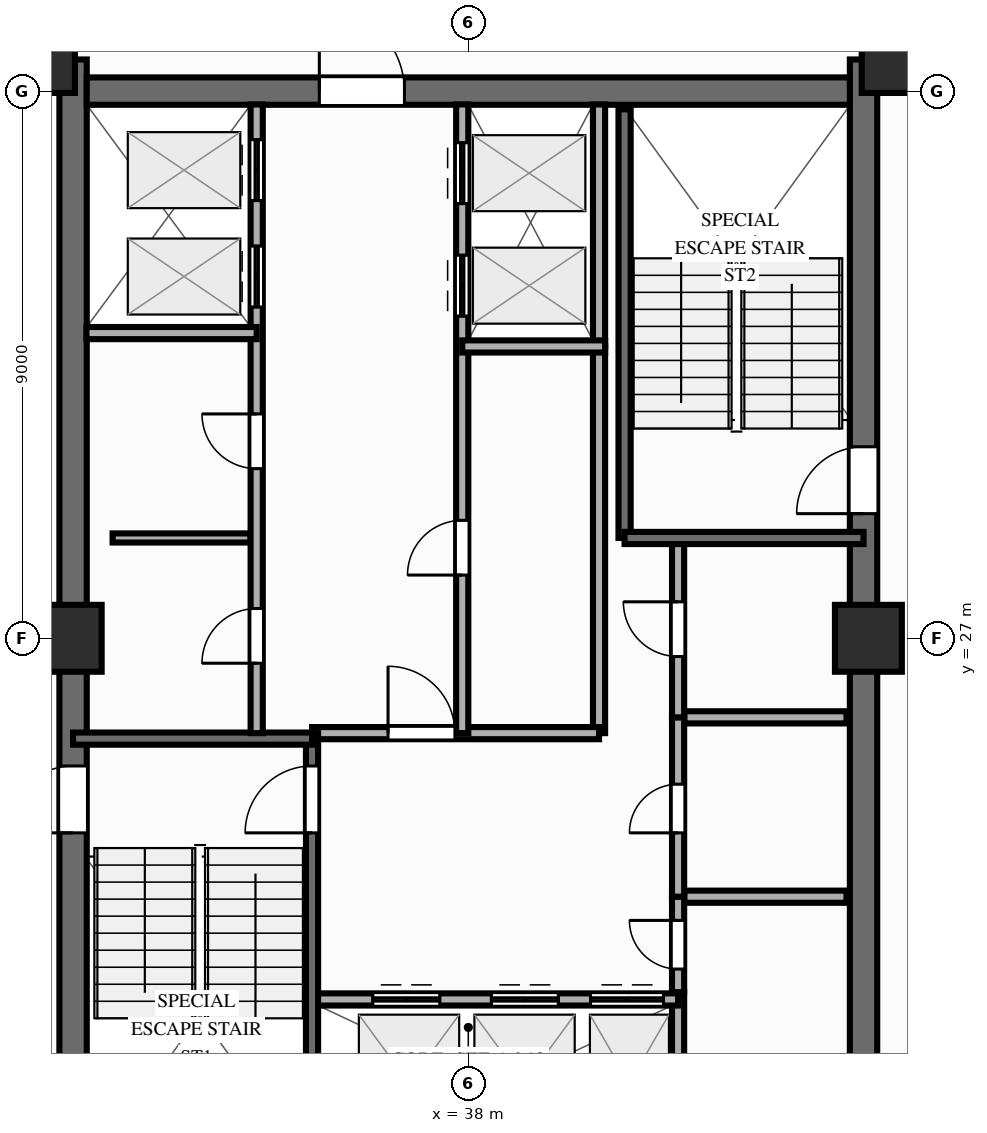
"""IFC4 building model, lengths in metres.
Left out: names, types, materials, properties, quantities, classifications, styles, units other than length and angle.
Written with IfcOpenShell. Run it as: python <this file> out.ifc"""

import sys

from ifc_helpers import new_model, si_unit, direction, frame, frame_2d, origin, origin_2d, place, context, subcontext, project, spatial, rectangle, extrude, source, transform, mapped, element, fill, save


model = new_model("IFC4")
c1 = context("Model", 3, precision=1e-05, world=origin(), true_north=direction((0.0, 1.0)))
c2 = subcontext(c1, "Body", "Model", "MODEL_VIEW")
j1 = project(units=[si_unit("LENGTHUNIT", "METRE"), si_unit("PLANEANGLEUNIT", "RADIAN")], contexts=[c1])
p1 = place(None, origin())
s1 = spatial("IfcSite", under=j1, at=p1, CompositionType="ELEMENT")
p2 = place(p1, origin())
s2 = spatial("IfcBuilding", under=s1, at=p2, CompositionType="ELEMENT")
p3 = place(p2, frame((0.0, 0.0, 202.6)))
s3 = spatial("IfcBuildingStorey", under=s2, at=p3, CompositionType="ELEMENT", Elevation=202.6)
p4 = place(p3, frame((31.5, 17.48, 0.0), z_axis=(0.0, 0.0, 1.0), x_axis=(0.0, 1.0, 0.0)))
e1 = element("IfcWall", 1, at=p4, inside=s3, PredefinedType="SHEAR", context=c2, shape_type="SweptSolid", body=[
    extrude(rectangle(XDim=19.04, YDim=0.45, at=frame_2d((9.52, 0.0))), origin(), (0.0, 0.0, 1.0), 3.9),
])
p5 = place(p4, frame((6.32, 0.0, 0.0)))
e2 = element("IfcOpeningElement", 2, at=p5, cuts=e1, PredefinedType="OPENING", context=c2, shape_type="SweptSolid", body=[
    extrude(rectangle(XDim=1.1, YDim=2.15, at=frame_2d((0.55, 1.075))), frame((0.0, 0.237, 0.0), z_axis=(0.0, -1.0, 0.0), x_axis=(1.0, 0.0, 0.0)), (0.0, 0.0, 1.0), 0.474),
])
p6 = place(p3, frame((44.5, 17.48, 0.0), z_axis=(0.0, 0.0, 1.0), x_axis=(0.0, 1.0, 0.0)))
e3 = element("IfcWall", 3, at=p6, inside=s3, PredefinedType="SHEAR", context=c2, shape_type="SweptSolid", body=[
    extrude(rectangle(XDim=19.04, YDim=0.45, at=frame_2d((9.52, 0.0))), origin(), (0.0, 0.0, 1.0), 3.9),
])
p7 = place(p6, frame((12.67, 0.0, 0.0), z_axis=(0.0, 0.0, 1.0), x_axis=(-1.0, 0.0, 0.0)))
e4 = element("IfcOpeningElement", 4, at=p7, cuts=e3, PredefinedType="OPENING", context=c2, shape_type="SweptSolid", body=[
    extrude(rectangle(XDim=1.1, YDim=2.15, at=frame_2d((0.55, 1.075))), frame((0.0, 0.237, 0.0), z_axis=(0.0, -1.0, 0.0), x_axis=(1.0, 0.0, 0.0)), (0.0, 0.0, 1.0), 0.474),
])
p8 = place(p3, frame((31.725, 36.0, 0.0), z_axis=(0.0, 0.0, 1.0), x_axis=(1.0, 0.0, 0.0)))
e5 = element("IfcWall", 5, at=p8, inside=s3, PredefinedType="SHEAR", context=c2, shape_type="SweptSolid", body=[
    extrude(rectangle(XDim=12.55, YDim=0.45, at=frame_2d((6.275, 0.0))), origin(), (0.0, 0.0, 1.0), 3.9),
])
p9 = place(p8, frame((5.225, 0.0, 0.0), z_axis=(0.0, 0.0, 1.0), x_axis=(-1.0, 0.0, 0.0)))
e6 = element("IfcOpeningElement", 6, at=p9, cuts=e5, PredefinedType="OPENING", context=c2, shape_type="SweptSolid", body=[
    extrude(rectangle(XDim=1.4, YDim=2.15, at=frame_2d((0.7, 1.075))), frame((0.0, 0.237, 0.0), z_axis=(0.0, -1.0, 0.0), x_axis=(1.0, 0.0, 0.0)), (0.0, 0.0, 1.0), 0.474),
])
m1 = source(origin(), c2, "Body", "SweptSolid", [
    extrude(rectangle(XDim=1.1, YDim=1.1, at=origin_2d()), origin(), (0.0, 0.0, 1.0), 3.9),
])
for number, where, z_axis, x_axis in (
    (7, (30.98, 36.52, 0.0), (0.0, 0.0, 1.0), (1.0, 0.0, 0.0)),
    (8, (45.02, 36.52, 0.0), (0.0, 0.0, 1.0), (1.0, 0.0, 0.0)),
    (9, (31.42, 27.0, 0.0), (0.0, 0.0, 1.0), (1.0, 0.0, 0.0)),
    (10, (44.58, 27.0, 0.0), (0.0, 0.0, 1.0), (1.0, 0.0, 0.0)),
):
    element("IfcColumn", number, at=place(p3, frame(where, z_axis=z_axis, x_axis=x_axis)), inside=s3, PredefinedType="COLUMN", context=c2, shape_type="MappedRepresentation", body=[
        mapped(m1, transform((0.0, 0.0, 0.0), scale=1.0)),
    ])
p10 = place(p3, frame((32.15, 28.65, 0.0), z_axis=(0.0, 0.0, 1.0), x_axis=(1.0, 0.0, 0.0)))
e11 = element("IfcWall", 11, at=p10, inside=s3, PredefinedType="PARTITIONING", context=c2, shape_type="SweptSolid", body=[
    extrude(rectangle(XDim=2.27, YDim=0.15, at=frame_2d((1.135, 0.0))), origin(), (0.0, 0.0, 1.0), 3.04),
])
p11 = place(p3, frame((41.55, 22.75, 0.0), z_axis=(0.0, 0.0, 1.0), x_axis=(1.0, 0.0, 0.0)))
e12 = element("IfcWall", 12, at=p11, inside=s3, PredefinedType="PARTITIONING", context=c2, shape_type="SweptSolid", body=[
    extrude(rectangle(XDim=2.67, YDim=0.2, at=frame_2d((1.335, 0.0))), origin(), (0.0, 0.0, 1.0), 3.6),
])
p12 = place(p3, frame((41.55, 25.7, 0.0), z_axis=(0.0, 0.0, 1.0), x_axis=(1.0, 0.0, 0.0)))
e13 = element("IfcWall", 13, at=p12, inside=s3, PredefinedType="PARTITIONING", context=c2, shape_type="SweptSolid", body=[
    extrude(rectangle(XDim=2.67, YDim=0.2, at=frame_2d((1.335, 0.0))), origin(), (0.0, 0.0, 1.0), 3.04),
])
p13 = place(p3, frame((41.45, 18.22, 0.0), z_axis=(0.0, 0.0, 1.0), x_axis=(0.0, 1.0, 0.0)))
e14 = element("IfcWall", 14, at=p13, inside=s3, PredefinedType="PARTITIONING", context=c2, shape_type="SweptSolid", body=[
    extrude(rectangle(XDim=2.96, YDim=0.2, at=frame_2d((1.48, 0.0))), origin(), (0.0, 0.0, 1.0), 3.6),
])
p14 = place(p3, frame((41.45, 21.18, 0.0), z_axis=(0.0, 0.0, 1.0), x_axis=(0.0, 1.0, 0.0)))
e15 = element("IfcWall", 15, at=p14, inside=s3, PredefinedType="PARTITIONING", context=c2, shape_type="SweptSolid", body=[
    extrude(rectangle(XDim=1.57, YDim=0.2, at=frame_2d((0.785, 0.0))), origin(), (0.0, 0.0, 1.0), 3.6),
])
p15 = place(p14, frame((0.38, 0.0, 0.0)))
e16 = element("IfcOpeningElement", 16, at=p15, cuts=e15, PredefinedType="OPENING", context=c2, shape_type="SweptSolid", body=[
    extrude(rectangle(XDim=0.8, YDim=2.05, at=frame_2d((0.4, 1.025))), frame((0.0, 0.112, 0.0), z_axis=(0.0, -1.0, 0.0), x_axis=(1.0, 0.0, 0.0)), (0.0, 0.0, 1.0), 0.224),
])
p16 = place(p3, frame((41.45, 22.75, 0.0), z_axis=(0.0, 0.0, 1.0), x_axis=(0.0, 1.0, 0.0)))
e17 = element("IfcWall", 17, at=p16, inside=s3, PredefinedType="PARTITIONING", context=c2, shape_type="SweptSolid", body=[
    extrude(rectangle(XDim=2.95, YDim=0.2, at=frame_2d((1.475, 0.0))), origin(), (0.0, 0.0, 1.0), 3.6),
])
p17 = place(p16, frame((1.05, 0.0, 0.0)))
e18 = element("IfcOpeningElement", 18, at=p17, cuts=e17, PredefinedType="OPENING", context=c2, shape_type="SweptSolid", body=[
    extrude(rectangle(XDim=0.8, YDim=2.05, at=frame_2d((0.4, 1.025))), frame((0.0, 0.112, 0.0), z_axis=(0.0, -1.0, 0.0), x_axis=(1.0, 0.0, 0.0)), (0.0, 0.0, 1.0), 0.224),
])
p18 = place(p3, frame((41.45, 25.7, 0.0), z_axis=(0.0, 0.0, 1.0), x_axis=(0.0, 1.0, 0.0)))
e19 = element("IfcWall", 19, at=p18, inside=s3, PredefinedType="PARTITIONING", context=c2, shape_type="SweptSolid", body=[
    extrude(rectangle(XDim=2.9, YDim=0.2, at=frame_2d((1.45, 0.0))), origin(), (0.0, 0.0, 1.0), 3.6),
])
p19 = place(p18, frame((1.0, 0.0, 0.0)))
e20 = element("IfcOpeningElement", 20, at=p19, cuts=e19, PredefinedType="OPENING", context=c2, shape_type="SweptSolid", body=[
    extrude(rectangle(XDim=0.9, YDim=2.1, at=frame_2d((0.45, 1.05))), frame((0.0, 0.112, 0.0), z_axis=(0.0, -1.0, 0.0), x_axis=(1.0, 0.0, 0.0)), (0.0, 0.0, 1.0), 0.224),
])
p20 = place(p3, frame((40.15, 25.44, 0.0), z_axis=(0.0, 0.0, 1.0), x_axis=(0.0, 1.0, 0.0)))
e21 = element("IfcWall", 21, at=p20, inside=s3, PredefinedType="PARTITIONING", context=c2, shape_type="SweptSolid", body=[
    extrude(rectangle(XDim=6.36, YDim=0.2, at=frame_2d((3.18, 0.0))), origin(), (0.0, 0.0, 1.0), 3.6),
])
p21 = place(p3, frame((40.15, 31.8, 0.0), z_axis=(0.0, 0.0, 1.0), x_axis=(0.0, 1.0, 0.0)))
e22 = element("IfcWall", 22, at=p21, inside=s3, PredefinedType="PARTITIONING", context=c2, shape_type="SweptSolid", body=[
    extrude(rectangle(XDim=3.98, YDim=0.2, at=frame_2d((1.99, 0.0))), origin(), (0.0, 0.0, 1.0), 3.6),
])
p22 = place(p3, frame((35.43, 21.06, 0.0), z_axis=(0.0, 0.0, 1.0), x_axis=(1.0, 0.0, 0.0)))
e23 = element("IfcWall", 23, at=p22, inside=s3, PredefinedType="PARTITIONING", context=c2, shape_type="SweptSolid", body=[
    extrude(rectangle(XDim=6.02, YDim=0.2, at=frame_2d((3.01, 0.0))), origin(), (0.0, 0.0, 1.0), 3.6),
])
p23 = place(p22, frame((1.0, 0.0, 0.0)))
e24 = element("IfcOpeningElement", 24, at=p23, cuts=e23, PredefinedType="OPENING", context=c2, shape_type="SweptSolid", body=[
    extrude(rectangle(XDim=1.1, YDim=2.15, at=frame_2d((0.55, 1.075))), frame((0.0, 0.112, 0.0), z_axis=(0.0, -1.0, 0.0), x_axis=(1.0, 0.0, 0.0)), (0.0, 0.0, 1.0), 0.224),
])
p24 = place(p22, frame((2.95, 0.0, 0.0)))
e25 = element("IfcOpeningElement", 25, at=p24, cuts=e23, PredefinedType="OPENING", context=c2, shape_type="SweptSolid", body=[
    extrude(rectangle(XDim=1.1, YDim=2.15, at=frame_2d((0.55, 1.075))), frame((0.0, 0.112, 0.0), z_axis=(0.0, -1.0, 0.0), x_axis=(1.0, 0.0, 0.0)), (0.0, 0.0, 1.0), 0.224),
])
p25 = place(p22, frame((4.58, 0.0, 0.0)))
e26 = element("IfcOpeningElement", 26, at=p25, cuts=e23, PredefinedType="OPENING", context=c2, shape_type="SweptSolid", body=[
    extrude(rectangle(XDim=1.2, YDim=2.15, at=frame_2d((0.6, 1.075))), frame((0.0, 0.112, 0.0), z_axis=(0.0, -1.0, 0.0), x_axis=(1.0, 0.0, 0.0)), (0.0, 0.0, 1.0), 0.224),
])
p26 = place(p3, frame((35.43, 25.44, 0.0), z_axis=(0.0, 0.0, 1.0), x_axis=(1.0, 0.0, 0.0)))
e27 = element("IfcWall", 27, at=p26, inside=s3, PredefinedType="PARTITIONING", context=c2, shape_type="SweptSolid", body=[
    extrude(rectangle(XDim=4.72, YDim=0.2, at=frame_2d((2.36, 0.0))), origin(), (0.0, 0.0, 1.0), 3.6),
])
p27 = place(p26, frame((1.25, 0.0, 0.0)))
e28 = element("IfcOpeningElement", 28, at=p27, cuts=e27, PredefinedType="OPENING", context=c2, shape_type="SweptSolid", body=[
    extrude(rectangle(XDim=1.1, YDim=2.15, at=frame_2d((0.55, 1.075))), frame((0.0, 0.112, 0.0), z_axis=(0.0, -1.0, 0.0), x_axis=(1.0, 0.0, 0.0)), (0.0, 0.0, 1.0), 0.224),
])
p28 = place(p3, frame((35.43, 18.22, 0.0), z_axis=(0.0, 0.0, 1.0), x_axis=(0.0, 1.0, 0.0)))
e29 = element("IfcWall", 29, at=p28, inside=s3, PredefinedType="SOLIDWALL", context=c2, shape_type="SweptSolid", body=[
    extrude(rectangle(XDim=7.22, YDim=0.2, at=frame_2d((3.61, 0.0))), origin(), (0.0, 0.0, 1.0), 3.6),
])
p29 = place(p28, frame((6.68, 0.0, 0.0), z_axis=(0.0, 0.0, 1.0), x_axis=(-1.0, 0.0, 0.0)))
e30 = element("IfcOpeningElement", 30, at=p29, cuts=e29, PredefinedType="OPENING", context=c2, shape_type="SweptSolid", body=[
    extrude(rectangle(XDim=1.1, YDim=2.15, at=frame_2d((0.55, 1.075))), frame((0.0, 0.112, 0.0), z_axis=(0.0, -1.0, 0.0), x_axis=(1.0, 0.0, 0.0)), (0.0, 0.0, 1.0), 0.224),
])
p30 = place(p3, frame((31.5, 25.35, 0.0), z_axis=(0.0, 0.0, 1.0), x_axis=(1.0, 0.0, 0.0)))
e31 = element("IfcWall", 31, at=p30, inside=s3, PredefinedType="SOLIDWALL", context=c2, shape_type="SweptSolid", body=[
    extrude(rectangle(XDim=3.93, YDim=0.2, at=frame_2d((1.965, 0.0))), origin(), (0.0, 0.0, 1.0), 3.6),
])
p31 = place(p3, frame((40.57, 28.65, 0.0), z_axis=(0.0, 0.0, 1.0), x_axis=(0.0, 1.0, 0.0)))
e32 = element("IfcWall", 32, at=p31, inside=s3, PredefinedType="SOLIDWALL", context=c2, shape_type="SweptSolid", body=[
    extrude(rectangle(XDim=7.05, YDim=0.2, at=frame_2d((3.525, 0.0))), origin(), (0.0, 0.0, 1.0), 3.6),
])
p32 = place(p3, frame((40.57, 28.65, 0.0), z_axis=(0.0, 0.0, 1.0), x_axis=(1.0, 0.0, 0.0)))
e33 = element("IfcWall", 33, at=p32, inside=s3, PredefinedType="SOLIDWALL", context=c2, shape_type="SweptSolid", body=[
    extrude(rectangle(XDim=3.93, YDim=0.2, at=frame_2d((1.965, 0.0))), origin(), (0.0, 0.0, 1.0), 3.6),
])
p33 = place(p3, frame((34.52, 25.44, 0.0), z_axis=(0.0, 0.0, 1.0), x_axis=(0.0, 1.0, 0.0)))
e34 = element("IfcWall", 34, at=p33, inside=s3, PredefinedType="PARTITIONING", context=c2, shape_type="SweptSolid", body=[
    extrude(rectangle(XDim=10.34, YDim=0.2, at=frame_2d((5.17, 0.0))), origin(), (0.0, 0.0, 1.0), 3.6),
])
p34 = place(p33, frame((1.15, 0.0, 0.0)))
e35 = element("IfcOpeningElement", 35, at=p34, cuts=e34, PredefinedType="OPENING", context=c2, shape_type="SweptSolid", body=[
    extrude(rectangle(XDim=0.9, YDim=2.1, at=frame_2d((0.45, 1.05))), frame((0.0, 0.112, 0.0), z_axis=(0.0, -1.0, 0.0), x_axis=(1.0, 0.0, 0.0)), (0.0, 0.0, 1.0), 0.224),
])
p35 = place(p33, frame((4.35, 0.0, 0.0)))
e36 = element("IfcOpeningElement", 36, at=p35, cuts=e34, PredefinedType="OPENING", context=c2, shape_type="SweptSolid", body=[
    extrude(rectangle(XDim=0.9, YDim=2.1, at=frame_2d((0.45, 1.05))), frame((0.0, 0.112, 0.0), z_axis=(0.0, -1.0, 0.0), x_axis=(1.0, 0.0, 0.0)), (0.0, 0.0, 1.0), 0.224),
])
p36 = place(p33, frame((7.01, 0.0, 0.0)))
e37 = element("IfcOpeningElement", 37, at=p36, cuts=e34, PredefinedType="OPENING", context=c2, shape_type="SweptSolid", body=[
    extrude(rectangle(XDim=1.0, YDim=2.15, at=frame_2d((0.5, 1.075))), frame((0.0, 0.112, 0.0), z_axis=(0.0, -1.0, 0.0), x_axis=(1.0, 0.0, 0.0)), (0.0, 0.0, 1.0), 0.224),
])
p37 = place(p33, frame((8.76, 0.0, 0.0)))
e38 = element("IfcOpeningElement", 38, at=p37, cuts=e34, PredefinedType="OPENING", context=c2, shape_type="SweptSolid", body=[
    extrude(rectangle(XDim=1.0, YDim=2.15, at=frame_2d((0.5, 1.075))), frame((0.0, 0.112, 0.0), z_axis=(0.0, -1.0, 0.0), x_axis=(1.0, 0.0, 0.0)), (0.0, 0.0, 1.0), 0.224),
])
p38 = place(p3, frame((31.72, 32.02, 0.0), z_axis=(0.0, 0.0, 1.0), x_axis=(1.0, 0.0, 0.0)))
e39 = element("IfcWall", 39, at=p38, inside=s3, PredefinedType="PARTITIONING", context=c2, shape_type="SweptSolid", body=[
    extrude(rectangle(XDim=2.8, YDim=0.2, at=frame_2d((1.4, 0.0))), origin(), (0.0, 0.0, 1.0), 3.6),
])
p39 = place(p3, frame((37.9, 25.44, 0.0), z_axis=(0.0, 0.0, 1.0), x_axis=(0.0, 1.0, 0.0)))
e40 = element("IfcWall", 40, at=p39, inside=s3, PredefinedType="PARTITIONING", context=c2, shape_type="SweptSolid", body=[
    extrude(rectangle(XDim=10.34, YDim=0.2, at=frame_2d((5.17, 0.0))), origin(), (0.0, 0.0, 1.0), 3.6),
])
p40 = place(p39, frame((2.6, 0.0, 0.0)))
e41 = element("IfcOpeningElement", 41, at=p40, cuts=e40, PredefinedType="OPENING", context=c2, shape_type="SweptSolid", body=[
    extrude(rectangle(XDim=0.9, YDim=2.1, at=frame_2d((0.45, 1.05))), frame((0.0, 0.112, 0.0), z_axis=(0.0, -1.0, 0.0), x_axis=(1.0, 0.0, 0.0)), (0.0, 0.0, 1.0), 0.224),
])
p41 = place(p39, frame((6.86, 0.0, 0.0)))
e42 = element("IfcOpeningElement", 42, at=p41, cuts=e40, PredefinedType="OPENING", context=c2, shape_type="SweptSolid", body=[
    extrude(rectangle(XDim=1.0, YDim=2.15, at=frame_2d((0.5, 1.075))), frame((0.0, 0.112, 0.0), z_axis=(0.0, -1.0, 0.0), x_axis=(1.0, 0.0, 0.0)), (0.0, 0.0, 1.0), 0.224),
])
p42 = place(p39, frame((8.71, 0.0, 0.0)))
e43 = element("IfcOpeningElement", 43, at=p42, cuts=e40, PredefinedType="OPENING", context=c2, shape_type="SweptSolid", body=[
    extrude(rectangle(XDim=1.0, YDim=2.15, at=frame_2d((0.5, 1.075))), frame((0.0, 0.112, 0.0), z_axis=(0.0, -1.0, 0.0), x_axis=(1.0, 0.0, 0.0)), (0.0, 0.0, 1.0), 0.224),
])
p43 = place(p3, frame((37.9, 31.8, 0.0), z_axis=(0.0, 0.0, 1.0), x_axis=(1.0, 0.0, 0.0)))
e44 = element("IfcWall", 44, at=p43, inside=s3, PredefinedType="PARTITIONING", context=c2, shape_type="SweptSolid", body=[
    extrude(rectangle(XDim=2.35, YDim=0.2, at=frame_2d((1.175, 0.0))), origin(), (0.0, 0.0, 1.0), 3.6),
])
m2 = source(origin(), c2, "Body", "SweptSolid", [
    extrude(rectangle(XDim=1.1, YDim=2.15, at=frame_2d((0.55, 1.075))), frame((0.0, 0.025, 0.0), z_axis=(0.0, -1.0, 0.0), x_axis=(1.0, 0.0, 0.0)), (0.0, 0.0, 1.0), 0.05),
])
p44 = place(p5, origin())
e45 = element("IfcDoor", 45, at=p44, inside=s3, OperationType="SINGLE_SWING_LEFT", PredefinedType="DOOR", context=c2, shape_type="MappedRepresentation", body=[
    mapped(m2, transform((0.0, 0.0, 0.0), scale=1.0)),
])
fill(e2, e45)
p45 = place(p7, origin())
e46 = element("IfcDoor", 46, at=p45, inside=s3, OperationType="SINGLE_SWING_RIGHT", PredefinedType="DOOR", context=c2, shape_type="MappedRepresentation", body=[
    mapped(m2, transform((0.0, 0.0, 0.0), scale=1.0)),
])
fill(e4, e46)
m3 = source(origin(), c2, "Body", "SweptSolid", [
    extrude(rectangle(XDim=1.4, YDim=2.15, at=frame_2d((0.7, 1.075))), frame((0.0, 0.025, 0.0), z_axis=(0.0, -1.0, 0.0), x_axis=(1.0, 0.0, 0.0)), (0.0, 0.0, 1.0), 0.05),
])
p46 = place(p9, origin())
e47 = element("IfcDoor", 47, at=p46, inside=s3, OperationType="SINGLE_SWING_RIGHT", PredefinedType="DOOR", context=c2, shape_type="MappedRepresentation", body=[
    mapped(m3, transform((0.0, 0.0, 0.0), scale=1.0)),
])
fill(e6, e47)
m4 = source(origin(), c2, "Body", "SweptSolid", [
    extrude(rectangle(XDim=0.8, YDim=2.05, at=frame_2d((0.4, 1.025))), frame((0.0, 0.025, 0.0), z_axis=(0.0, -1.0, 0.0), x_axis=(1.0, 0.0, 0.0)), (0.0, 0.0, 1.0), 0.05),
])
p47 = place(p15, origin())
e48 = element("IfcDoor", 48, at=p47, inside=s3, OperationType="SINGLE_SWING_RIGHT", PredefinedType="DOOR", context=c2, shape_type="MappedRepresentation", body=[
    mapped(m4, transform((0.0, 0.0, 0.0), scale=1.0)),
])
fill(e16, e48)
p48 = place(p17, origin())
e49 = element("IfcDoor", 49, at=p48, inside=s3, OperationType="SINGLE_SWING_LEFT", PredefinedType="DOOR", context=c2, shape_type="MappedRepresentation", body=[
    mapped(m4, transform((0.0, 0.0, 0.0), scale=1.0)),
])
fill(e18, e49)
m5 = source(origin(), c2, "Body", "SweptSolid", [
    extrude(rectangle(XDim=0.9, YDim=2.1, at=frame_2d((0.45, 1.05))), frame((0.0, 0.025, 0.0), z_axis=(0.0, -1.0, 0.0), x_axis=(1.0, 0.0, 0.0)), (0.0, 0.0, 1.0), 0.05),
])
p49 = place(p19, origin())
e50 = element("IfcDoor", 50, at=p49, inside=s3, OperationType="SINGLE_SWING_RIGHT", PredefinedType="DOOR", context=c2, shape_type="MappedRepresentation", body=[
    mapped(m5, transform((0.0, 0.0, 0.0), scale=1.0)),
])
fill(e20, e50)
p50 = place(p23, origin())
e51 = element("IfcDoor", 51, at=p50, inside=s3, OperationType="DOUBLE_DOOR_SLIDING", PredefinedType="DOOR", context=c2, shape_type="MappedRepresentation", body=[
    mapped(m2, transform((0.0, 0.0, 0.0), scale=1.0)),
])
fill(e24, e51)
p51 = place(p24, origin())
e52 = element("IfcDoor", 52, at=p51, inside=s3, OperationType="DOUBLE_DOOR_SLIDING", PredefinedType="DOOR", context=c2, shape_type="MappedRepresentation", body=[
    mapped(m2, transform((0.0, 0.0, 0.0), scale=1.0)),
])
fill(e25, e52)
m6 = source(origin(), c2, "Body", "SweptSolid", [
    extrude(rectangle(XDim=1.2, YDim=2.15, at=frame_2d((0.6, 1.075))), frame((0.0, 0.025, 0.0), z_axis=(0.0, -1.0, 0.0), x_axis=(1.0, 0.0, 0.0)), (0.0, 0.0, 1.0), 0.05),
])
p52 = place(p25, origin())
e53 = element("IfcDoor", 53, at=p52, inside=s3, OperationType="DOUBLE_DOOR_SLIDING", PredefinedType="DOOR", context=c2, shape_type="MappedRepresentation", body=[
    mapped(m6, transform((0.0, 0.0, 0.0), scale=1.0)),
])
fill(e26, e53)
p53 = place(p27, origin())
e54 = element("IfcDoor", 54, at=p53, inside=s3, OperationType="SINGLE_SWING_LEFT", PredefinedType="DOOR", context=c2, shape_type="MappedRepresentation", body=[
    mapped(m2, transform((0.0, 0.0, 0.0), scale=1.0)),
])
fill(e28, e54)
p54 = place(p29, origin())
e55 = element("IfcDoor", 55, at=p54, inside=s3, OperationType="SINGLE_SWING_RIGHT", PredefinedType="DOOR", context=c2, shape_type="MappedRepresentation", body=[
    mapped(m2, transform((0.0, 0.0, 0.0), scale=1.0)),
])
fill(e30, e55)
p55 = place(p34, origin())
e56 = element("IfcDoor", 56, at=p55, inside=s3, OperationType="SINGLE_SWING_LEFT", PredefinedType="DOOR", context=c2, shape_type="MappedRepresentation", body=[
    mapped(m5, transform((0.0, 0.0, 0.0), scale=1.0)),
])
fill(e35, e56)
p56 = place(p35, origin())
e57 = element("IfcDoor", 57, at=p56, inside=s3, OperationType="SINGLE_SWING_RIGHT", PredefinedType="DOOR", context=c2, shape_type="MappedRepresentation", body=[
    mapped(m5, transform((0.0, 0.0, 0.0), scale=1.0)),
])
fill(e36, e57)
m7 = source(origin(), c2, "Body", "SweptSolid", [
    extrude(rectangle(XDim=1.0, YDim=2.15, at=frame_2d((0.5, 1.075))), frame((0.0, 0.025, 0.0), z_axis=(0.0, -1.0, 0.0), x_axis=(1.0, 0.0, 0.0)), (0.0, 0.0, 1.0), 0.05),
])
p57 = place(p36, origin())
e58 = element("IfcDoor", 58, at=p57, inside=s3, OperationType="DOUBLE_DOOR_SLIDING", PredefinedType="DOOR", context=c2, shape_type="MappedRepresentation", body=[
    mapped(m7, transform((0.0, 0.0, 0.0), scale=1.0)),
])
fill(e37, e58)
p58 = place(p37, origin())
e59 = element("IfcDoor", 59, at=p58, inside=s3, OperationType="DOUBLE_DOOR_SLIDING", PredefinedType="DOOR", context=c2, shape_type="MappedRepresentation", body=[
    mapped(m7, transform((0.0, 0.0, 0.0), scale=1.0)),
])
fill(e38, e59)
p59 = place(p40, origin())
e60 = element("IfcDoor", 60, at=p59, inside=s3, OperationType="SINGLE_SWING_LEFT", PredefinedType="DOOR", context=c2, shape_type="MappedRepresentation", body=[
    mapped(m5, transform((0.0, 0.0, 0.0), scale=1.0)),
])
fill(e41, e60)
p60 = place(p41, origin())
e61 = element("IfcDoor", 61, at=p60, inside=s3, OperationType="DOUBLE_DOOR_SLIDING", PredefinedType="DOOR", context=c2, shape_type="MappedRepresentation", body=[
    mapped(m7, transform((0.0, 0.0, 0.0), scale=1.0)),
])
fill(e42, e61)
p61 = place(p42, origin())
e62 = element("IfcDoor", 62, at=p61, inside=s3, OperationType="DOUBLE_DOOR_SLIDING", PredefinedType="DOOR", context=c2, shape_type="MappedRepresentation", body=[
    mapped(m7, transform((0.0, 0.0, 0.0), scale=1.0)),
])
fill(e43, e62)
save(model, sys.argv[1])
